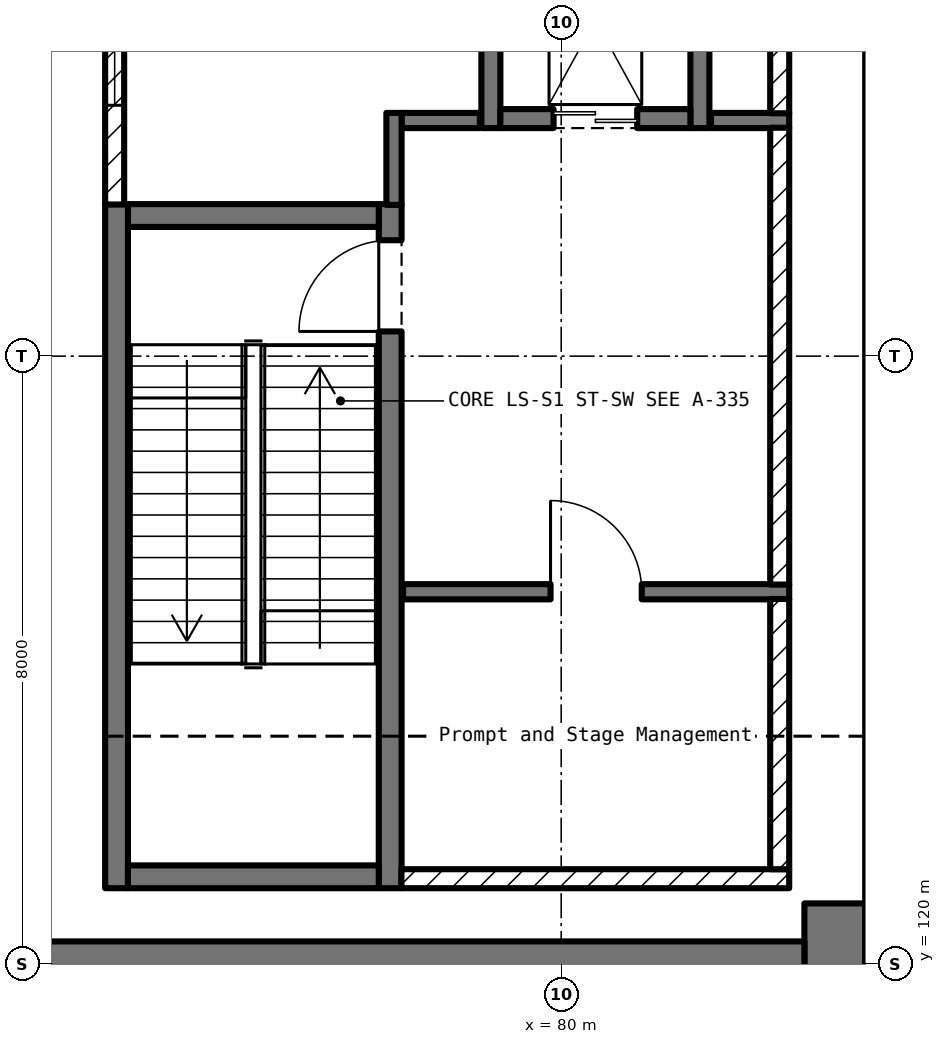
"""IFC4 building model, lengths in metres.
Left out: names, types, materials, properties, quantities, classifications, styles, units other than length and angle.
Written with IfcOpenShell. Run it as: python <this file> out.ifc"""

import sys

from ifc_helpers import new_model, si_unit, direction, frame, frame_2d, origin, place, context, subcontext, project, spatial, rectangle, extrude, element, fill, save


model = new_model("IFC4")
c1 = context("Model", 3, precision=1e-05, world=origin(), true_north=direction((0.0, 1.0)))
c2 = subcontext(c1, "Body", "Model", "MODEL_VIEW")
j1 = project(units=[si_unit("LENGTHUNIT", "METRE"), si_unit("PLANEANGLEUNIT", "RADIAN")], contexts=[c1])
p1 = place(None, origin())
s1 = spatial("IfcSite", under=j1, at=p1, CompositionType="ELEMENT")
p2 = place(p1, origin())
s2 = spatial("IfcBuilding", under=s1, at=p2, CompositionType="ELEMENT")
p3 = place(p2, frame((0.0, 0.0, 6.0)))
s3 = spatial("IfcBuildingStorey", under=s2, at=p3, CompositionType="ELEMENT", Elevation=6.0)
p4 = place(p3, frame((83.6, 116.0, 0.0), z_axis=(0.0, 0.0, 1.0), x_axis=(0.0, 1.0, 0.0)))
e1 = element("IfcWall", 1, at=p4, inside=s3, PredefinedType="SHEAR", context=c2, shape_type="SweptSolid", body=[
    extrude(rectangle(XDim=4.8, YDim=0.8, at=frame_2d((2.4, 0.0))), origin(), (0.0, 0.0, 1.0), 5.5),
])
p5 = place(p3, frame((60.6, 120.0, 0.0), z_axis=(0.0, 0.0, 1.0), x_axis=(1.0, 0.0, 0.0)))
e2 = element("IfcWall", 2, at=p5, inside=s3, PredefinedType="SHEAR", context=c2, shape_type="SweptSolid", body=[
    extrude(rectangle(XDim=22.6, YDim=0.6, at=frame_2d((11.3, 0.0))), origin(), (0.0, 0.0, 1.0), 5.5),
])
p6 = place(p3, frame((77.75, 121.0, 0.0), z_axis=(0.0, 0.0, 1.0), x_axis=(0.0, 1.0, 0.0)))
e3 = element("IfcWall", 3, at=p6, inside=s3, PredefinedType="SOLIDWALL", context=c2, shape_type="SweptSolid", body=[
    extrude(rectangle(XDim=9.0, YDim=0.3, at=frame_2d((4.5, 0.0))), origin(), (0.0, 0.0, 1.0), 5.5),
])
p7 = place(p6, frame((7.325, 0.0, 0.0)))
e4 = element("IfcOpeningElement", 4, at=p7, cuts=e3, PredefinedType="OPENING", context=c2, shape_type="SweptSolid", body=[
    extrude(rectangle(XDim=1.2, YDim=2.1, at=frame_2d((0.6, 1.05))), frame((0.0, 0.162, 0.0), z_axis=(0.0, -1.0, 0.0), x_axis=(1.0, 0.0, 0.0)), (0.0, 0.0, 1.0), 0.324),
])
p8 = place(p3, frame((77.6, 129.85, 0.0), z_axis=(0.0, 0.0, 1.0), x_axis=(-1.0, 0.0, 0.0)))
e5 = element("IfcWall", 5, at=p8, inside=s3, PredefinedType="SOLIDWALL", context=c2, shape_type="SweptSolid", body=[
    extrude(rectangle(XDim=3.3, YDim=0.3, at=frame_2d((1.65, 0.0))), origin(), (0.0, 0.0, 1.0), 5.5),
])
p9 = place(p3, frame((74.15, 130.0, 0.0), z_axis=(0.0, 0.0, 1.0), x_axis=(0.0, -1.0, 0.0)))
e6 = element("IfcWall", 6, at=p9, inside=s3, PredefinedType="SOLIDWALL", context=c2, shape_type="SweptSolid", body=[
    extrude(rectangle(XDim=9.0, YDim=0.3, at=frame_2d((4.5, 0.0))), origin(), (0.0, 0.0, 1.0), 5.5),
])
p10 = place(p3, frame((74.3, 121.15, 0.0), z_axis=(0.0, 0.0, 1.0), x_axis=(1.0, 0.0, 0.0)))
e7 = element("IfcWall", 7, at=p10, inside=s3, PredefinedType="SOLIDWALL", context=c2, shape_type="SweptSolid", body=[
    extrude(rectangle(XDim=3.3, YDim=0.3, at=frame_2d((1.65, 0.0))), origin(), (0.0, 0.0, 1.0), 5.5),
])
for number, where, z_axis, x_axis in (
    (8, (81.825, 131.0, 0.0), (0.0, 0.0, 1.0), (0.0, 1.0, 0.0)),
    (9, (79.075, 135.0, 0.0), (0.0, 0.0, 1.0), (0.0, -1.0, 0.0)),
):
    element("IfcWall", number, at=place(p3, frame(where, z_axis=z_axis, x_axis=x_axis)), inside=s3, PredefinedType="SOLIDWALL", context=c2, shape_type="SweptSolid", body=[
        extrude(rectangle(XDim=4.0, YDim=0.25, at=frame_2d((2.0, 0.0))), origin(), (0.0, 0.0, 1.0), 5.5),
    ])
p11 = place(p3, frame((79.2, 131.125, 0.0), z_axis=(0.0, 0.0, 1.0), x_axis=(1.0, 0.0, 0.0)))
e10 = element("IfcWall", 10, at=p11, inside=s3, PredefinedType="SOLIDWALL", context=c2, shape_type="SweptSolid", body=[
    extrude(rectangle(XDim=2.5, YDim=0.25, at=frame_2d((1.25, 0.0))), origin(), (0.0, 0.0, 1.0), 5.5),
])
p12 = place(p11, frame((0.7, 0.0, 0.0)))
e11 = element("IfcOpeningElement", 11, at=p12, cuts=e10, PredefinedType="OPENING", context=c2, shape_type="SweptSolid", body=[
    extrude(rectangle(XDim=1.1, YDim=2.1, at=frame_2d((0.55, 1.05))), frame((0.0, 0.137, 0.0), z_axis=(0.0, -1.0, 0.0), x_axis=(1.0, 0.0, 0.0)), (0.0, 0.0, 1.0), 0.274),
])
for number, where, z_axis, x_axis in (
    (12, (83.0, 131.1, 0.0), (0.0, 0.0, 1.0), (-1.0, 0.0, 0.0)),
    (13, (78.93, 131.1, 0.0), (0.0, 0.0, 1.0), (-1.0, 0.0, 0.0)),
):
    element("IfcWall", number, at=place(p3, frame(where, z_axis=z_axis, x_axis=x_axis)), inside=s3, PredefinedType="PARTITIONING", context=c2, shape_type="SweptSolid", body=[
        extrude(rectangle(XDim=1.03, YDim=0.2, at=frame_2d((0.515, 0.0))), origin(), (0.0, 0.0, 1.0), 5.28),
    ])
p13 = place(p3, frame((77.8, 131.2, 0.0), z_axis=(0.0, 0.0, 1.0), x_axis=(0.0, -1.0, 0.0)))
e14 = element("IfcWall", 14, at=p13, inside=s3, PredefinedType="PARTITIONING", context=c2, shape_type="SweptSolid", body=[
    extrude(rectangle(XDim=1.21, YDim=0.2, at=frame_2d((0.605, 0.0))), origin(), (0.0, 0.0, 1.0), 5.28),
])
p14 = place(p3, frame((77.92, 124.9, 0.0), z_axis=(0.0, 0.0, 1.0), x_axis=(1.0, 0.0, 0.0)))
e15 = element("IfcWall", 15, at=p14, inside=s3, PredefinedType="PARTITIONING", context=c2, shape_type="SweptSolid", body=[
    extrude(rectangle(XDim=5.08, YDim=0.2, at=frame_2d((2.54, 0.0))), origin(), (0.0, 0.0, 1.0), 5.28),
])
p15 = place(p14, frame((1.94, 0.0, 0.0)))
e16 = element("IfcOpeningElement", 16, at=p15, cuts=e15, PredefinedType="OPENING", context=c2, shape_type="SweptSolid", body=[
    extrude(rectangle(XDim=1.2, YDim=2.1, at=frame_2d((0.6, 1.05))), frame((0.0, 0.112, 0.0), z_axis=(0.0, -1.0, 0.0), x_axis=(1.0, 0.0, 0.0)), (0.0, 0.0, 1.0), 0.224),
])
p16 = place(p3, frame((74.125, 134.75, 0.0), z_axis=(0.0, 0.0, 1.0), x_axis=(0.0, -1.0, 0.0)))
e17 = element("IfcWall", 17, at=p16, inside=s3, PredefinedType="SOLIDWALL", context=c2, shape_type="SweptSolid", body=[
    extrude(rectangle(XDim=4.755, YDim=0.25, at=frame_2d((2.377, 0.0))), origin(), (0.0, 0.0, 1.0), 5.28),
])
p17 = place(p16, frame((1.05, 0.0, 2.6)))
e18 = element("IfcOpeningElement", 18, at=p17, cuts=e17, PredefinedType="OPENING", context=c2, shape_type="SweptSolid", body=[
    extrude(rectangle(XDim=2.4, YDim=1.2, at=frame_2d((1.2, 0.6))), frame((0.0, 0.137, 0.0), z_axis=(0.0, -1.0, 0.0), x_axis=(1.0, 0.0, 0.0)), (0.0, 0.0, 1.0), 0.274),
])
p18 = place(p3, frame((77.898, 121.125, 0.0), z_axis=(0.0, 0.0, 1.0), x_axis=(1.0, 0.0, 0.0)))
e19 = element("IfcWall", 19, at=p18, inside=s3, PredefinedType="SOLIDWALL", context=c2, shape_type="SweptSolid", body=[
    extrude(rectangle(XDim=5.102, YDim=0.25, at=frame_2d((2.551, 0.0))), origin(), (0.0, 0.0, 1.0), 5.28),
])
p19 = place(p3, frame((82.875, 121.25, 0.0), z_axis=(0.0, 0.0, 1.0), x_axis=(0.0, 1.0, 0.0)))
e20 = element("IfcWall", 20, at=p19, inside=s3, PredefinedType="SOLIDWALL", context=c2, shape_type="SweptSolid", body=[
    extrude(rectangle(XDim=3.555, YDim=0.25, at=frame_2d((1.777, 0.0))), origin(), (0.0, 0.0, 1.0), 5.28),
])
p20 = place(p3, frame((82.875, 124.995, 0.0), z_axis=(0.0, 0.0, 1.0), x_axis=(0.0, 1.0, 0.0)))
e21 = element("IfcWall", 21, at=p20, inside=s3, PredefinedType="SOLIDWALL", context=c2, shape_type="SweptSolid", body=[
    extrude(rectangle(XDim=6.01, YDim=0.25, at=frame_2d((3.005, 0.0))), origin(), (0.0, 0.0, 1.0), 5.28),
])
p21 = place(p3, frame((82.875, 131.195, 0.0), z_axis=(0.0, 0.0, 1.0), x_axis=(0.0, 1.0, 0.0)))
e22 = element("IfcWall", 22, at=p21, inside=s3, PredefinedType="SOLIDWALL", context=c2, shape_type="SweptSolid", body=[
    extrude(rectangle(XDim=3.805, YDim=0.25, at=frame_2d((1.902, 0.0))), origin(), (0.0, 0.0, 1.0), 5.28),
])
p22 = place(p7, origin())
e23 = element("IfcDoor", 23, at=p22, inside=s3, OperationType="SINGLE_SWING_LEFT", PredefinedType="DOOR", context=c2, shape_type="SweptSolid", body=[
    extrude(rectangle(XDim=1.2, YDim=2.1, at=frame_2d((0.6, 1.05))), frame((0.0, 0.025, 0.0), z_axis=(0.0, -1.0, 0.0), x_axis=(1.0, 0.0, 0.0)), (0.0, 0.0, 1.0), 0.05),
])
fill(e4, e23)
p23 = place(p12, origin())
e24 = element("IfcDoor", 24, at=p23, inside=s3, OperationType="DOUBLE_DOOR_SLIDING", PredefinedType="DOOR", context=c2, shape_type="SweptSolid", body=[
    extrude(rectangle(XDim=1.1, YDim=2.1, at=frame_2d((0.55, 1.05))), frame((0.0, 0.025, 0.0), z_axis=(0.0, -1.0, 0.0), x_axis=(1.0, 0.0, 0.0)), (0.0, 0.0, 1.0), 0.05),
])
fill(e11, e24)
p24 = place(p15, origin())
e25 = element("IfcDoor", 25, at=p24, inside=s3, OperationType="SINGLE_SWING_LEFT", PredefinedType="DOOR", context=c2, shape_type="SweptSolid", body=[
    extrude(rectangle(XDim=1.2, YDim=2.1, at=frame_2d((0.6, 1.05))), frame((0.0, 0.025, 0.0), z_axis=(0.0, -1.0, 0.0), x_axis=(1.0, 0.0, 0.0)), (0.0, 0.0, 1.0), 0.05),
])
fill(e16, e25)
p25 = place(p17, origin())
e26 = element("IfcWindow", 26, at=p25, inside=s3, PartitioningType="SINGLE_PANEL", PredefinedType="WINDOW", context=c2, shape_type="SweptSolid", body=[
    extrude(rectangle(XDim=2.4, YDim=1.2, at=frame_2d((1.2, 0.6))), frame((0.0, 0.03, 0.0), z_axis=(0.0, -1.0, 0.0), x_axis=(1.0, 0.0, 0.0)), (0.0, 0.0, 1.0), 0.06),
])
fill(e18, e26)
save(model, sys.argv[1])
